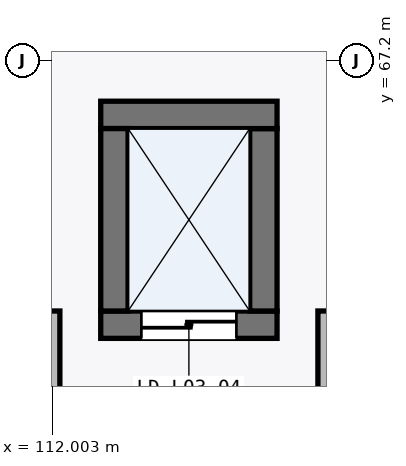
"""IFC4 building model, lengths in metres.
Left out: names, types, materials, properties, quantities, classifications, styles, units other than length and angle.
Written with IfcOpenShell. Run it as: python <this file> out.ifc"""

import sys

from ifc_helpers import new_model, si_unit, direction, frame, frame_2d, origin, place, context, subcontext, project, spatial, rectangle, extrude, element, fill, save


model = new_model("IFC4")
c1 = context("Model", 3, precision=1e-05, world=origin(), true_north=direction((0.0, 1.0)))
c2 = subcontext(c1, "Body", "Model", "MODEL_VIEW")
j1 = project(units=[si_unit("LENGTHUNIT", "METRE"), si_unit("PLANEANGLEUNIT", "RADIAN")], contexts=[c1])
p1 = place(None, origin())
s1 = spatial("IfcSite", under=j1, at=p1, CompositionType="ELEMENT")
p2 = place(p1, origin())
s2 = spatial("IfcBuilding", under=s1, at=p2, CompositionType="ELEMENT")
p3 = place(p2, frame((0.0, 0.0, 11.4)))
s3 = spatial("IfcBuildingStorey", under=s2, at=p3, CompositionType="ELEMENT", Elevation=11.4)
p4 = place(p3, frame((112.64, 63.72, 0.0), z_axis=(0.0, 0.0, 1.0), x_axis=(1.0, 0.0, 0.0)))
e1 = element("IfcWall", 1, at=p4, inside=s3, PredefinedType="SHEAR", context=c2, shape_type="SweptSolid", body=[
    extrude(rectangle(XDim=2.32, YDim=0.36, at=frame_2d((1.16, 0.0))), origin(), (0.0, 0.0, 1.0), 4.845),
])
p5 = place(p4, frame((0.535, 0.0, 0.0)))
e2 = element("IfcOpeningElement", 2, at=p5, cuts=e1, PredefinedType="OPENING", context=c2, shape_type="SweptSolid", body=[
    extrude(rectangle(XDim=1.25, YDim=2.2, at=frame_2d((0.625, 1.1))), frame((0.0, 0.19, 0.0), z_axis=(0.0, -1.0, 0.0), x_axis=(1.0, 0.0, 0.0)), (0.0, 0.0, 1.0), 0.38),
])
p6 = place(p3, frame((114.78, 63.9, 0.0), z_axis=(0.0, 0.0, 1.0), x_axis=(0.0, 1.0, 0.0)))
e3 = element("IfcWall", 3, at=p6, inside=s3, PredefinedType="SHEAR", context=c2, shape_type="SweptSolid", body=[
    extrude(rectangle(XDim=2.4, YDim=0.36, at=frame_2d((1.2, 0.0))), origin(), (0.0, 0.0, 1.0), 4.845),
])
p7 = place(p3, frame((114.96, 66.48, 0.0), z_axis=(0.0, 0.0, 1.0), x_axis=(-1.0, 0.0, 0.0)))
e4 = element("IfcWall", 4, at=p7, inside=s3, PredefinedType="SHEAR", context=c2, shape_type="SweptSolid", body=[
    extrude(rectangle(XDim=2.32, YDim=0.36, at=frame_2d((1.16, 0.0))), origin(), (0.0, 0.0, 1.0), 4.845),
])
p8 = place(p3, frame((112.82, 66.3, 0.0), z_axis=(0.0, 0.0, 1.0), x_axis=(0.0, -1.0, 0.0)))
e5 = element("IfcWall", 5, at=p8, inside=s3, PredefinedType="SHEAR", context=c2, shape_type="SweptSolid", body=[
    extrude(rectangle(XDim=2.4, YDim=0.36, at=frame_2d((1.2, 0.0))), origin(), (0.0, 0.0, 1.0), 4.845),
])
for number, where, z_axis, x_axis in (
    (6, (115.6, 59.397, 0.0), (0.0, 0.0, 1.0), (0.0, 1.0, 0.0)),
    (7, (112.0, 63.9, 0.0), (0.0, 0.0, 1.0), (0.0, -1.0, 0.0)),
):
    element("IfcWall", number, at=place(p3, frame(where, z_axis=z_axis, x_axis=x_axis)), inside=s3, PredefinedType="PARTITIONING", context=c2, shape_type="SweptSolid", body=[
        extrude(rectangle(XDim=4.502, YDim=0.205, at=frame_2d((2.251, 0.0))), origin(), (0.0, 0.0, 1.0), 4.845),
    ])
p9 = place(p5, frame((1.25, 0.0, 0.0), z_axis=(0.0, 0.0, 1.0), x_axis=(-1.0, 0.0, 0.0)))
e8 = element("IfcDoor", 8, at=p9, inside=s3, OperationType="DOUBLE_DOOR_SLIDING", PredefinedType="DOOR", context=c2, shape_type="SweptSolid", body=[
    extrude(rectangle(XDim=1.25, YDim=2.2, at=frame_2d((0.625, 1.1))), frame((0.0, 0.025, 0.0), z_axis=(0.0, -1.0, 0.0), x_axis=(1.0, 0.0, 0.0)), (0.0, 0.0, 1.0), 0.05),
])
fill(e2, e8)
save(model, sys.argv[1])
